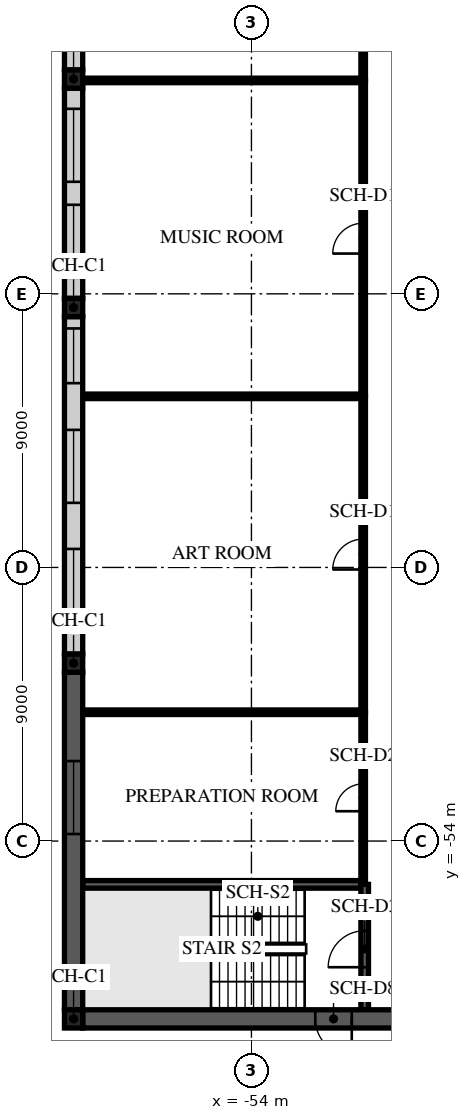
"""IFC4 building model, lengths in metres.
Left out: names, types, materials, properties, quantities, classifications, styles, units other than length and angle.
Written with IfcOpenShell. Run it as: python <this file> out.ifc"""

import sys

from ifc_helpers import new_model, si_unit, direction, frame, frame_2d, origin, origin_2d, place, context, subcontext, project, spatial, rectangle, extrude, element, fill, save


model = new_model("IFC4")
c1 = context("Model", 3, precision=1e-05, world=origin(), true_north=direction((0.0, 1.0)))
c2 = subcontext(c1, "Body", "Model", "MODEL_VIEW")
j1 = project(units=[si_unit("LENGTHUNIT", "METRE"), si_unit("PLANEANGLEUNIT", "RADIAN")], contexts=[c1])
p1 = place(None, origin())
s1 = spatial("IfcSite", under=j1, at=p1, CompositionType="ELEMENT")
p2 = place(p1, origin())
s2 = spatial("IfcBuilding", under=s1, at=p2, CompositionType="ELEMENT")
p3 = place(p2, origin())
s3 = spatial("IfcBuildingStorey", under=s2, at=p3, CompositionType="ELEMENT", Elevation=0.0)
for number, where, z_axis, x_axis in (
    (1, (-59.85, -59.85, -0.2), (0.0, 0.0, 1.0), (1.0, 0.0, 0.0)),
    (2, (-59.85, -48.15, -0.2), (0.0, 0.0, 1.0), (1.0, 0.0, 0.0)),
    (3, (-59.85, -36.45, -0.2), (0.0, 0.0, 1.0), (1.0, 0.0, 0.0)),
    (4, (-59.85, -28.936, -0.2), (0.0, 0.0, 1.0), (1.0, 0.0, 0.0)),
):
    element("IfcColumn", number, at=place(p3, frame(where, z_axis=z_axis, x_axis=x_axis)), inside=s3, PredefinedType="COLUMN", context=c2, shape_type="SweptSolid", body=[
        extrude(rectangle(XDim=0.6, YDim=0.6, at=origin_2d()), origin(), (0.0, 0.0, 1.0), 4.7),
    ])
p4 = place(p3, frame((-59.55, -55.425, 0.0), z_axis=(0.0, 0.0, 1.0), x_axis=(1.0, 0.0, 0.0)))
e5 = element("IfcWall", 5, at=p4, inside=s3, PredefinedType="SHEAR", context=c2, shape_type="SweptSolid", body=[
    extrude(rectangle(XDim=9.15, YDim=0.25, at=frame_2d((4.575, 0.0))), origin(), (0.0, 0.0, 1.0), 4.1),
])
for number, where, z_axis, x_axis in (
    (6, (-59.55, -49.763, 0.0), (0.0, 0.0, 1.0), (1.0, 0.0, 0.0)),
    (7, (-59.55, -39.371, 0.0), (0.0, 0.0, 1.0), (1.0, 0.0, 0.0)),
    (8, (-59.55, -28.98, 0.0), (0.0, 0.0, 1.0), (1.0, 0.0, 0.0)),
):
    element("IfcWall", number, at=place(p3, frame(where, z_axis=z_axis, x_axis=x_axis)), inside=s3, PredefinedType="PARTITIONING", context=c2, shape_type="SweptSolid", body=[
        extrude(rectangle(XDim=9.15, YDim=0.15, at=frame_2d((4.575, 0.0))), origin(), (0.0, 0.0, 1.0), 4.1),
    ])
p5 = place(p3, frame((-50.275, -59.55, 0.0), z_axis=(0.0, 0.0, 1.0), x_axis=(0.0, 1.0, 0.0)))
e9 = element("IfcWall", 9, at=p5, inside=s3, PredefinedType="SHEAR", context=c2, shape_type="SweptSolid", body=[
    extrude(rectangle(XDim=4.125, YDim=0.25, at=frame_2d((2.062, 0.0))), origin(), (0.0, 0.0, 1.0), 4.1),
])
p6 = place(p5, frame((1.4, 0.0, 0.0)))
e10 = element("IfcOpeningElement", 10, at=p6, cuts=e9, PredefinedType="OPENING", context=c2, shape_type="SweptSolid", body=[
    extrude(rectangle(XDim=1.2, YDim=2.1, at=frame_2d((0.6, 1.05))), frame((0.0, 0.135, 0.0), z_axis=(0.0, -1.0, 0.0), x_axis=(1.0, 0.0, 0.0)), (0.0, 0.0, 1.0), 0.27),
])
p7 = place(p3, frame((-50.325, -55.425, 0.0), z_axis=(0.0, 0.0, 1.0), x_axis=(0.0, 1.0, 0.0)))
e11 = element("IfcWall", 11, at=p7, inside=s3, PredefinedType="PARTITIONING", context=c2, shape_type="SweptSolid", body=[
    extrude(rectangle(XDim=5.662, YDim=0.15, at=frame_2d((2.831, 0.0))), origin(), (0.0, 0.0, 1.0), 4.1),
])
p8 = place(p7, frame((2.406, 0.0, 0.0)))
e12 = element("IfcOpeningElement", 12, at=p8, cuts=e11, PredefinedType="OPENING", context=c2, shape_type="SweptSolid", body=[
    extrude(rectangle(XDim=0.9, YDim=2.1, at=frame_2d((0.45, 1.05))), frame((0.0, 0.085, 0.0), z_axis=(0.0, -1.0, 0.0), x_axis=(1.0, 0.0, 0.0)), (0.0, 0.0, 1.0), 0.17),
])
p9 = place(p3, frame((-50.325, -49.763, 0.0), z_axis=(0.0, 0.0, 1.0), x_axis=(0.0, 1.0, 0.0)))
e13 = element("IfcWall", 13, at=p9, inside=s3, PredefinedType="PARTITIONING", context=c2, shape_type="SweptSolid", body=[
    extrude(rectangle(XDim=10.392, YDim=0.15, at=frame_2d((5.196, 0.0))), origin(), (0.0, 0.0, 1.0), 4.1),
])
p10 = place(p9, frame((4.696, 0.0, 0.0)))
e14 = element("IfcOpeningElement", 14, at=p10, cuts=e13, PredefinedType="OPENING", context=c2, shape_type="SweptSolid", body=[
    extrude(rectangle(XDim=1.0, YDim=2.1, at=frame_2d((0.5, 1.05))), frame((0.0, 0.085, 0.0), z_axis=(0.0, -1.0, 0.0), x_axis=(1.0, 0.0, 0.0)), (0.0, 0.0, 1.0), 0.17),
])
p11 = place(p3, frame((-50.325, -39.371, 0.0), z_axis=(0.0, 0.0, 1.0), x_axis=(0.0, 1.0, 0.0)))
e15 = element("IfcWall", 15, at=p11, inside=s3, PredefinedType="PARTITIONING", context=c2, shape_type="SweptSolid", body=[
    extrude(rectangle(XDim=10.391, YDim=0.15, at=frame_2d((5.196, 0.0))), origin(), (0.0, 0.0, 1.0), 4.1),
])
p12 = place(p11, frame((4.696, 0.0, 0.0)))
e16 = element("IfcOpeningElement", 16, at=p12, cuts=e15, PredefinedType="OPENING", context=c2, shape_type="SweptSolid", body=[
    extrude(rectangle(XDim=1.0, YDim=2.1, at=frame_2d((0.5, 1.05))), frame((0.0, 0.085, 0.0), z_axis=(0.0, -1.0, 0.0), x_axis=(1.0, 0.0, 0.0)), (0.0, 0.0, 1.0), 0.17),
])
p13 = place(p3, frame((-50.325, -28.98, 0.0), z_axis=(0.0, 0.0, 1.0), x_axis=(0.0, 1.0, 0.0)))
e17 = element("IfcWall", 17, at=p13, inside=s3, PredefinedType="PARTITIONING", context=c2, shape_type="SweptSolid", body=[
    extrude(rectangle(XDim=10.392, YDim=0.15, at=frame_2d((5.196, 0.0))), origin(), (0.0, 0.0, 1.0), 4.1),
])
p14 = place(p13, frame((4.696, 0.0, 0.0)))
e18 = element("IfcOpeningElement", 18, at=p14, cuts=e17, PredefinedType="OPENING", context=c2, shape_type="SweptSolid", body=[
    extrude(rectangle(XDim=1.0, YDim=2.1, at=frame_2d((0.5, 1.05))), frame((0.0, 0.085, 0.0), z_axis=(0.0, -1.0, 0.0), x_axis=(1.0, 0.0, 0.0)), (0.0, 0.0, 1.0), 0.17),
])
p15 = place(p3, frame((-59.85, -59.55, -0.2), z_axis=(0.0, 0.0, 1.0), x_axis=(0.0, 1.0, 0.0)))
e19 = element("IfcWall", 19, at=p15, inside=s3, PredefinedType="STANDARD", context=c2, shape_type="SweptSolid", body=[
    extrude(rectangle(XDim=11.1, YDim=0.6, at=frame_2d((5.55, 0.0))), origin(), (0.0, 0.0, 1.0), 4.3),
])
p16 = place(p15, frame((5.781, 0.0, 1.1)))
e20 = element("IfcOpeningElement", 20, at=p16, cuts=e19, PredefinedType="OPENING", context=c2, shape_type="SweptSolid", body=[
    extrude(rectangle(XDim=2.4, YDim=2.1, at=frame_2d((1.2, 1.05))), frame((0.0, 0.31, 0.0), z_axis=(0.0, -1.0, 0.0), x_axis=(1.0, 0.0, 0.0)), (0.0, 0.0, 1.0), 0.62),
])
p17 = place(p3, frame((-59.85, -47.85, -0.2), z_axis=(0.0, 0.0, 1.0), x_axis=(0.0, 1.0, 0.0)))
e21 = element("IfcWall", 21, at=p17, inside=s3, PredefinedType="STANDARD", context=c2, shape_type="SweptSolid", body=[
    extrude(rectangle(XDim=11.1, YDim=0.6, at=frame_2d((5.55, 0.0))), origin(), (0.0, 0.0, 1.0), 4.3),
])
p18 = place(p17, frame((1.058, 0.0, 1.1)))
e22 = element("IfcOpeningElement", 22, at=p18, cuts=e21, PredefinedType="OPENING", context=c2, shape_type="SweptSolid", body=[
    extrude(rectangle(XDim=2.4, YDim=2.1, at=frame_2d((1.2, 1.05))), frame((0.0, 0.31, 0.0), z_axis=(0.0, -1.0, 0.0), x_axis=(1.0, 0.0, 0.0)), (0.0, 0.0, 1.0), 0.62),
])
p19 = place(p17, frame((4.975, 0.0, 1.1)))
e23 = element("IfcOpeningElement", 23, at=p19, cuts=e21, PredefinedType="OPENING", context=c2, shape_type="SweptSolid", body=[
    extrude(rectangle(XDim=2.4, YDim=2.1, at=frame_2d((1.2, 1.05))), frame((0.0, 0.31, 0.0), z_axis=(0.0, -1.0, 0.0), x_axis=(1.0, 0.0, 0.0)), (0.0, 0.0, 1.0), 0.62),
])
p20 = place(p17, frame((8.912, 0.0, 1.1)))
e24 = element("IfcOpeningElement", 24, at=p20, cuts=e21, PredefinedType="OPENING", context=c2, shape_type="SweptSolid", body=[
    extrude(rectangle(XDim=1.8, YDim=2.1, at=frame_2d((0.9, 1.05))), frame((0.0, 0.31, 0.0), z_axis=(0.0, -1.0, 0.0), x_axis=(1.0, 0.0, 0.0)), (0.0, 0.0, 1.0), 0.62),
])
p21 = place(p3, frame((-59.85, -36.15, -0.2), z_axis=(0.0, 0.0, 1.0), x_axis=(0.0, 1.0, 0.0)))
e25 = element("IfcWall", 25, at=p21, inside=s3, PredefinedType="STANDARD", context=c2, shape_type="SweptSolid", body=[
    extrude(rectangle(XDim=6.914, YDim=0.6, at=frame_2d((3.457, 0.0))), origin(), (0.0, 0.0, 1.0), 4.3),
])
p22 = place(p21, frame((0.679, 0.0, 1.1)))
e26 = element("IfcOpeningElement", 26, at=p22, cuts=e25, PredefinedType="OPENING", context=c2, shape_type="SweptSolid", body=[
    extrude(rectangle(XDim=2.4, YDim=2.1, at=frame_2d((1.2, 1.05))), frame((0.0, 0.31, 0.0), z_axis=(0.0, -1.0, 0.0), x_axis=(1.0, 0.0, 0.0)), (0.0, 0.0, 1.0), 0.62),
])
p23 = place(p21, frame((3.836, 0.0, 1.1)))
e27 = element("IfcOpeningElement", 27, at=p23, cuts=e25, PredefinedType="OPENING", context=c2, shape_type="SweptSolid", body=[
    extrude(rectangle(XDim=2.4, YDim=2.1, at=frame_2d((1.2, 1.05))), frame((0.0, 0.31, 0.0), z_axis=(0.0, -1.0, 0.0), x_axis=(1.0, 0.0, 0.0)), (0.0, 0.0, 1.0), 0.62),
])
p24 = place(p3, frame((-59.85, -28.636, -0.2), z_axis=(0.0, 0.0, 1.0), x_axis=(0.0, 1.0, 0.0)))
e28 = element("IfcWall", 28, at=p24, inside=s3, PredefinedType="STANDARD", context=c2, shape_type="SweptSolid", body=[
    extrude(rectangle(XDim=6.914, YDim=0.6, at=frame_2d((3.457, 0.0))), origin(), (0.0, 0.0, 1.0), 4.3),
])
p25 = place(p24, frame((0.679, 0.0, 1.1)))
e29 = element("IfcOpeningElement", 29, at=p25, cuts=e28, PredefinedType="OPENING", context=c2, shape_type="SweptSolid", body=[
    extrude(rectangle(XDim=2.4, YDim=2.1, at=frame_2d((1.2, 1.05))), frame((0.0, 0.31, 0.0), z_axis=(0.0, -1.0, 0.0), x_axis=(1.0, 0.0, 0.0)), (0.0, 0.0, 1.0), 0.62),
])
p26 = place(p24, frame((3.836, 0.0, 1.1)))
e30 = element("IfcOpeningElement", 30, at=p26, cuts=e28, PredefinedType="OPENING", context=c2, shape_type="SweptSolid", body=[
    extrude(rectangle(XDim=2.4, YDim=2.1, at=frame_2d((1.2, 1.05))), frame((0.0, 0.31, 0.0), z_axis=(0.0, -1.0, 0.0), x_axis=(1.0, 0.0, 0.0)), (0.0, 0.0, 1.0), 0.62),
])
p27 = place(p3, frame((-48.45, -59.85, -0.2), z_axis=(0.0, 0.0, 1.0), x_axis=(-1.0, 0.0, 0.0)))
e31 = element("IfcWall", 31, at=p27, inside=s3, PredefinedType="STANDARD", context=c2, shape_type="SweptSolid", body=[
    extrude(rectangle(XDim=11.1, YDim=0.6, at=frame_2d((5.55, 0.0))), origin(), (0.0, 0.0, 1.0), 4.3),
])
p28 = place(p27, frame((2.25, 0.0, 0.2)))
e32 = element("IfcOpeningElement", 32, at=p28, cuts=e31, PredefinedType="OPENING", context=c2, shape_type="SweptSolid", body=[
    extrude(rectangle(XDim=1.2, YDim=2.1, at=frame_2d((0.6, 1.05))), frame((0.0, 0.31, 0.0), z_axis=(0.0, -1.0, 0.0), x_axis=(1.0, 0.0, 0.0)), (0.0, 0.0, 1.0), 0.62),
])
p29 = place(p6, origin())
e33 = element("IfcDoor", 33, at=p29, inside=s3, OperationType="SINGLE_SWING_LEFT", PredefinedType="DOOR", context=c2, shape_type="SweptSolid", body=[
    extrude(rectangle(XDim=1.2, YDim=2.1, at=frame_2d((0.6, 1.05))), frame((0.0, 0.025, 0.0), z_axis=(0.0, -1.0, 0.0), x_axis=(1.0, 0.0, 0.0)), (0.0, 0.0, 1.0), 0.05),
])
fill(e10, e33)
p30 = place(p8, origin())
e34 = element("IfcDoor", 34, at=p30, inside=s3, OperationType="SINGLE_SWING_RIGHT", PredefinedType="DOOR", context=c2, shape_type="SweptSolid", body=[
    extrude(rectangle(XDim=0.9, YDim=2.1, at=frame_2d((0.45, 1.05))), frame((0.0, 0.025, 0.0), z_axis=(0.0, -1.0, 0.0), x_axis=(1.0, 0.0, 0.0)), (0.0, 0.0, 1.0), 0.05),
])
fill(e12, e34)
p31 = place(p10, origin())
e35 = element("IfcDoor", 35, at=p31, inside=s3, OperationType="SINGLE_SWING_LEFT", PredefinedType="DOOR", context=c2, shape_type="SweptSolid", body=[
    extrude(rectangle(XDim=1.0, YDim=2.1, at=frame_2d((0.5, 1.05))), frame((0.0, 0.025, 0.0), z_axis=(0.0, -1.0, 0.0), x_axis=(1.0, 0.0, 0.0)), (0.0, 0.0, 1.0), 0.05),
])
fill(e14, e35)
p32 = place(p12, origin())
e36 = element("IfcDoor", 36, at=p32, inside=s3, OperationType="SINGLE_SWING_RIGHT", PredefinedType="DOOR", context=c2, shape_type="SweptSolid", body=[
    extrude(rectangle(XDim=1.0, YDim=2.1, at=frame_2d((0.5, 1.05))), frame((0.0, 0.025, 0.0), z_axis=(0.0, -1.0, 0.0), x_axis=(1.0, 0.0, 0.0)), (0.0, 0.0, 1.0), 0.05),
])
fill(e16, e36)
p33 = place(p28, origin())
e37 = element("IfcDoor", 37, at=p33, inside=s3, OperationType="SINGLE_SWING_LEFT", PredefinedType="DOOR", context=c2, shape_type="SweptSolid", body=[
    extrude(rectangle(XDim=1.2, YDim=2.1, at=frame_2d((0.6, 1.05))), frame((0.0, 0.025, 0.0), z_axis=(0.0, -1.0, 0.0), x_axis=(1.0, 0.0, 0.0)), (0.0, 0.0, 1.0), 0.05),
])
fill(e32, e37)
p34 = place(p16, origin())
e38 = element("IfcWindow", 38, at=p34, inside=s3, PartitioningType="SINGLE_PANEL", PredefinedType="WINDOW", context=c2, shape_type="SweptSolid", body=[
    extrude(rectangle(XDim=2.4, YDim=2.1, at=frame_2d((1.2, 1.05))), frame((0.0, 0.03, 0.0), z_axis=(0.0, -1.0, 0.0), x_axis=(1.0, 0.0, 0.0)), (0.0, 0.0, 1.0), 0.06),
])
fill(e20, e38)
p35 = place(p18, origin())
e39 = element("IfcWindow", 39, at=p35, inside=s3, PartitioningType="SINGLE_PANEL", PredefinedType="WINDOW", context=c2, shape_type="SweptSolid", body=[
    extrude(rectangle(XDim=2.4, YDim=2.1, at=frame_2d((1.2, 1.05))), frame((0.0, 0.03, 0.0), z_axis=(0.0, -1.0, 0.0), x_axis=(1.0, 0.0, 0.0)), (0.0, 0.0, 1.0), 0.06),
])
fill(e22, e39)
p36 = place(p19, origin())
e40 = element("IfcWindow", 40, at=p36, inside=s3, PartitioningType="SINGLE_PANEL", PredefinedType="WINDOW", context=c2, shape_type="SweptSolid", body=[
    extrude(rectangle(XDim=2.4, YDim=2.1, at=frame_2d((1.2, 1.05))), frame((0.0, 0.03, 0.0), z_axis=(0.0, -1.0, 0.0), x_axis=(1.0, 0.0, 0.0)), (0.0, 0.0, 1.0), 0.06),
])
fill(e23, e40)
p37 = place(p20, origin())
e41 = element("IfcWindow", 41, at=p37, inside=s3, PartitioningType="SINGLE_PANEL", PredefinedType="WINDOW", context=c2, shape_type="SweptSolid", body=[
    extrude(rectangle(XDim=1.8, YDim=2.1, at=frame_2d((0.9, 1.05))), frame((0.0, 0.03, 0.0), z_axis=(0.0, -1.0, 0.0), x_axis=(1.0, 0.0, 0.0)), (0.0, 0.0, 1.0), 0.06),
])
fill(e24, e41)
p38 = place(p22, origin())
e42 = element("IfcWindow", 42, at=p38, inside=s3, PartitioningType="SINGLE_PANEL", PredefinedType="WINDOW", context=c2, shape_type="SweptSolid", body=[
    extrude(rectangle(XDim=2.4, YDim=2.1, at=frame_2d((1.2, 1.05))), frame((0.0, 0.03, 0.0), z_axis=(0.0, -1.0, 0.0), x_axis=(1.0, 0.0, 0.0)), (0.0, 0.0, 1.0), 0.06),
])
fill(e26, e42)
p39 = place(p23, origin())
e43 = element("IfcWindow", 43, at=p39, inside=s3, PartitioningType="SINGLE_PANEL", PredefinedType="WINDOW", context=c2, shape_type="SweptSolid", body=[
    extrude(rectangle(XDim=2.4, YDim=2.1, at=frame_2d((1.2, 1.05))), frame((0.0, 0.03, 0.0), z_axis=(0.0, -1.0, 0.0), x_axis=(1.0, 0.0, 0.0)), (0.0, 0.0, 1.0), 0.06),
])
fill(e27, e43)
save(model, sys.argv[1])
